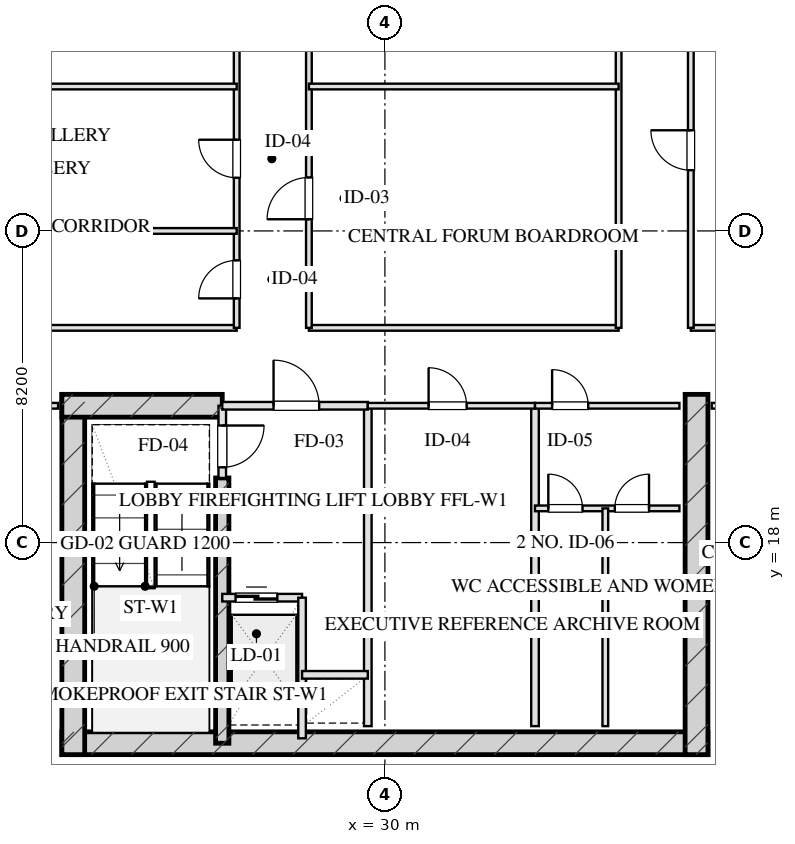
"""IFC4 building model, lengths in metres.
Left out: names, types, materials, properties, quantities, classifications, styles, units other than length and angle.
Written with IfcOpenShell. Run it as: python <this file> out.ifc"""

import sys

from ifc_helpers import new_model, si_unit, direction, frame, frame_2d, origin, place, context, subcontext, project, spatial, rectangle, extrude, element, fill, save


model = new_model("IFC4")
c1 = context("Model", 3, precision=1e-05, world=origin(), true_north=direction((0.0, 1.0)))
c2 = subcontext(c1, "Body", "Model", "MODEL_VIEW")
j1 = project(units=[si_unit("LENGTHUNIT", "METRE"), si_unit("PLANEANGLEUNIT", "RADIAN")], contexts=[c1])
p1 = place(None, origin())
s1 = spatial("IfcSite", under=j1, at=p1, CompositionType="ELEMENT")
p2 = place(p1, origin())
s2 = spatial("IfcBuilding", under=s1, at=p2, CompositionType="ELEMENT")
p3 = place(p2, frame((0.0, 0.0, 180.55)))
s3 = spatial("IfcBuildingStorey", under=s2, at=p3, CompositionType="ELEMENT", Elevation=180.55)
p4 = place(p3, frame((21.5, 12.72, 0.0), z_axis=(0.0, 0.0, 1.0), x_axis=(1.0, 0.0, 0.0)))
e1 = element("IfcWall", 1, at=p4, inside=s3, PredefinedType="SHEAR", context=c2, shape_type="SweptSolid", body=[
    extrude(rectangle(XDim=17.0, YDim=0.6, at=frame_2d((8.5, 0.0))), origin(), (0.0, 0.0, 1.0), 3.45),
])
for number, where, z_axis, x_axis in (
    (2, (21.8, 21.9, 0.0), (0.0, 0.0, 1.0), (0.0, -1.0, 0.0)),
    (3, (38.2, 21.9, 0.0), (0.0, 0.0, 1.0), (0.0, -1.0, 0.0)),
):
    element("IfcWall", number, at=place(p3, frame(where, z_axis=z_axis, x_axis=x_axis)), inside=s3, PredefinedType="SHEAR", context=c2, shape_type="SweptSolid", body=[
        extrude(rectangle(XDim=9.48, YDim=0.6, at=frame_2d((4.74, 0.0))), origin(), (0.0, 0.0, 1.0), 3.45),
    ])
p5 = place(p3, frame((25.72, 19.7, 0.0), z_axis=(0.0, 0.0, 1.0), x_axis=(0.0, -1.0, 0.0)))
e4 = element("IfcWall", 4, at=p5, inside=s3, PredefinedType="SHEAR", context=c2, shape_type="SweptSolid", body=[
    extrude(rectangle(XDim=6.98, YDim=0.35, at=frame_2d((3.49, 0.0))), origin(), (0.0, 0.0, 1.0), 3.45),
])
p6 = place(p3, frame((21.5, 21.6, 0.0), z_axis=(0.0, 0.0, 1.0), x_axis=(1.0, 0.0, 0.0)))
e5 = element("IfcWall", 5, at=p6, inside=s3, PredefinedType="SHEAR", context=c2, shape_type="SweptSolid", body=[
    extrude(rectangle(XDim=4.22, YDim=0.6, at=frame_2d((2.11, 0.0))), origin(), (0.0, 0.0, 1.0), 3.45),
])
p7 = place(p3, frame((25.72, 21.6, 0.0), z_axis=(0.0, 0.0, 1.0), x_axis=(0.0, -1.0, 0.0)))
e6 = element("IfcWall", 6, at=p7, inside=s3, PredefinedType="PARTITIONING", context=c2, shape_type="SweptSolid", body=[
    extrude(rectangle(XDim=1.9, YDim=0.2, at=frame_2d((0.95, 0.0))), origin(), (0.0, 0.0, 1.0), 3.155),
])
p8 = place(p7, frame((0.52, 0.0, 0.0)))
e7 = element("IfcOpeningElement", 7, at=p8, cuts=e6, PredefinedType="OPENING", context=c2, shape_type="SweptSolid", body=[
    extrude(rectangle(XDim=1.1, YDim=2.05, at=frame_2d((0.55, 1.025))), frame((0.0, 0.11, 0.0), z_axis=(0.0, -1.0, 0.0), x_axis=(1.0, 0.0, 0.0)), (0.0, 0.0, 1.0), 0.22),
])
p9 = place(p3, frame((29.55, 21.6, 0.0), z_axis=(0.0, 0.0, 1.0), x_axis=(0.0, -1.0, 0.0)))
e8 = element("IfcWall", 8, at=p9, inside=s3, PredefinedType="PARTITIONING", context=c2, shape_type="SweptSolid", body=[
    extrude(rectangle(XDim=8.43, YDim=0.2, at=frame_2d((4.215, 0.0))), origin(), (0.0, 0.0, 1.0), 3.155),
])
p10 = place(p3, frame((25.72, 21.6, 0.0), z_axis=(0.0, 0.0, 1.0), x_axis=(1.0, 0.0, 0.0)))
e9 = element("IfcWall", 9, at=p10, inside=s3, PredefinedType="PARTITIONING", context=c2, shape_type="SweptSolid", body=[
    extrude(rectangle(XDim=3.83, YDim=0.2, at=frame_2d((1.915, 0.0))), origin(), (0.0, 0.0, 1.0), 3.155),
])
p11 = place(p10, frame((1.35, 0.0, 0.0)))
e10 = element("IfcOpeningElement", 10, at=p11, cuts=e9, PredefinedType="OPENING", context=c2, shape_type="SweptSolid", body=[
    extrude(rectangle(XDim=1.2, YDim=2.05, at=frame_2d((0.6, 1.025))), frame((0.0, 0.11, 0.0), z_axis=(0.0, -1.0, 0.0), x_axis=(1.0, 0.0, 0.0)), (0.0, 0.0, 1.0), 0.22),
])
p12 = place(p3, frame((25.72, 16.55, 0.0), z_axis=(0.0, 0.0, 1.0), x_axis=(1.0, 0.0, 0.0)))
e11 = element("IfcWall", 11, at=p12, inside=s3, PredefinedType="PARTITIONING", context=c2, shape_type="SweptSolid", body=[
    extrude(rectangle(XDim=2.1, YDim=0.2, at=frame_2d((1.05, 0.0))), origin(), (0.0, 0.0, 1.0), 3.155),
])
p13 = place(p12, frame((0.35, 0.0, 0.0)))
e12 = element("IfcOpeningElement", 12, at=p13, cuts=e11, PredefinedType="OPENING", context=c2, shape_type="SweptSolid", body=[
    extrude(rectangle(XDim=1.1, YDim=2.05, at=frame_2d((0.55, 1.025))), frame((0.0, 0.11, 0.0), z_axis=(0.0, -1.0, 0.0), x_axis=(1.0, 0.0, 0.0)), (0.0, 0.0, 1.0), 0.22),
])
p14 = place(p3, frame((27.82, 16.55, 0.0), z_axis=(0.0, 0.0, 1.0), x_axis=(0.0, -1.0, 0.0)))
e13 = element("IfcWall", 13, at=p14, inside=s3, PredefinedType="PARTITIONING", context=c2, shape_type="SweptSolid", body=[
    extrude(rectangle(XDim=3.7, YDim=0.2, at=frame_2d((1.85, 0.0))), origin(), (0.0, 0.0, 1.0), 3.155),
])
p15 = place(p3, frame((27.82, 14.52, 0.0), z_axis=(0.0, 0.0, 1.0), x_axis=(1.0, 0.0, 0.0)))
e14 = element("IfcWall", 14, at=p15, inside=s3, PredefinedType="PARTITIONING", context=c2, shape_type="SweptSolid", body=[
    extrude(rectangle(XDim=1.73, YDim=0.2, at=frame_2d((0.865, 0.0))), origin(), (0.0, 0.0, 1.0), 3.155),
])
p16 = place(p3, frame((33.95, 21.6, 0.0), z_axis=(0.0, 0.0, 1.0), x_axis=(0.0, -1.0, 0.0)))
e15 = element("IfcWall", 15, at=p16, inside=s3, PredefinedType="PARTITIONING", context=c2, shape_type="SweptSolid", body=[
    extrude(rectangle(XDim=8.43, YDim=0.2, at=frame_2d((4.215, 0.0))), origin(), (0.0, 0.0, 1.0), 3.155),
])
p17 = place(p3, frame((29.55, 21.6, 0.0), z_axis=(0.0, 0.0, 1.0), x_axis=(1.0, 0.0, 0.0)))
e16 = element("IfcWall", 16, at=p17, inside=s3, PredefinedType="PARTITIONING", context=c2, shape_type="SweptSolid", body=[
    extrude(rectangle(XDim=4.4, YDim=0.15, at=frame_2d((2.2, 0.0))), origin(), (0.0, 0.0, 1.0), 3.155),
])
p18 = place(p17, frame((1.6, 0.0, 0.0)))
e17 = element("IfcOpeningElement", 17, at=p18, cuts=e16, PredefinedType="OPENING", context=c2, shape_type="SweptSolid", body=[
    extrude(rectangle(XDim=1.0, YDim=2.05, at=frame_2d((0.5, 1.025))), frame((0.0, 0.085, 0.0), z_axis=(0.0, -1.0, 0.0), x_axis=(1.0, 0.0, 0.0)), (0.0, 0.0, 1.0), 0.17),
])
p19 = place(p3, frame((33.95, 21.6, 0.0), z_axis=(0.0, 0.0, 1.0), x_axis=(1.0, 0.0, 0.0)))
e18 = element("IfcWall", 18, at=p19, inside=s3, PredefinedType="PARTITIONING", context=c2, shape_type="SweptSolid", body=[
    extrude(rectangle(XDim=3.8, YDim=0.15, at=frame_2d((1.9, 0.0))), origin(), (0.0, 0.0, 1.0), 3.155),
])
p20 = place(p19, frame((0.45, 0.0, 0.0)))
e19 = element("IfcOpeningElement", 19, at=p20, cuts=e18, PredefinedType="OPENING", context=c2, shape_type="SweptSolid", body=[
    extrude(rectangle(XDim=0.95, YDim=2.05, at=frame_2d((0.475, 1.025))), frame((0.0, 0.085, 0.0), z_axis=(0.0, -1.0, 0.0), x_axis=(1.0, 0.0, 0.0)), (0.0, 0.0, 1.0), 0.17),
])
p21 = place(p3, frame((33.95, 18.9, 0.0), z_axis=(0.0, 0.0, 1.0), x_axis=(1.0, 0.0, 0.0)))
e20 = element("IfcWall", 20, at=p21, inside=s3, PredefinedType="PARTITIONING", context=c2, shape_type="SweptSolid", body=[
    extrude(rectangle(XDim=3.8, YDim=0.15, at=frame_2d((1.9, 0.0))), origin(), (0.0, 0.0, 1.0), 3.155),
])
p22 = place(p21, frame((0.35, 0.0, 0.0)))
e21 = element("IfcOpeningElement", 21, at=p22, cuts=e20, PredefinedType="OPENING", context=c2, shape_type="SweptSolid", body=[
    extrude(rectangle(XDim=0.9, YDim=2.05, at=frame_2d((0.45, 1.025))), frame((0.0, 0.085, 0.0), z_axis=(0.0, -1.0, 0.0), x_axis=(1.0, 0.0, 0.0)), (0.0, 0.0, 1.0), 0.17),
])
p23 = place(p21, frame((2.1, 0.0, 0.0)))
e22 = element("IfcOpeningElement", 22, at=p23, cuts=e20, PredefinedType="OPENING", context=c2, shape_type="SweptSolid", body=[
    extrude(rectangle(XDim=0.9, YDim=2.05, at=frame_2d((0.45, 1.025))), frame((0.0, 0.085, 0.0), z_axis=(0.0, -1.0, 0.0), x_axis=(1.0, 0.0, 0.0)), (0.0, 0.0, 1.0), 0.17),
])
p24 = place(p3, frame((35.8, 18.9, 0.0), z_axis=(0.0, 0.0, 1.0), x_axis=(0.0, -1.0, 0.0)))
e23 = element("IfcWall", 23, at=p24, inside=s3, PredefinedType="PARTITIONING", context=c2, shape_type="SweptSolid", body=[
    extrude(rectangle(XDim=5.73, YDim=0.15, at=frame_2d((2.865, 0.0))), origin(), (0.0, 0.0, 1.0), 3.155),
])
p25 = place(p3, frame((13.2, 21.6, 0.0), z_axis=(0.0, 0.0, 1.0), x_axis=(1.0, 0.0, 0.0)))
e24 = element("IfcWall", 24, at=p25, inside=s3, PredefinedType="PARTITIONING", context=c2, shape_type="SweptSolid", body=[
    extrude(rectangle(XDim=8.2, YDim=0.15, at=frame_2d((4.1, 0.0))), origin(), (0.0, 0.0, 1.0), 3.155),
])
p26 = place(p25, frame((3.444, 0.0, 0.0)))
e25 = element("IfcOpeningElement", 25, at=p26, cuts=e24, PredefinedType="OPENING", context=c2, shape_type="SweptSolid", body=[
    extrude(rectangle(XDim=1.0, YDim=2.05, at=frame_2d((0.5, 1.025))), frame((0.0, 0.085, 0.0), z_axis=(0.0, -1.0, 0.0), x_axis=(1.0, 0.0, 0.0)), (0.0, 0.0, 1.0), 0.17),
])
p27 = place(p3, frame((38.6, 21.6, 0.0), z_axis=(0.0, 0.0, 1.0), x_axis=(1.0, 0.0, 0.0)))
e26 = element("IfcWall", 26, at=p27, inside=s3, PredefinedType="PARTITIONING", context=c2, shape_type="SweptSolid", body=[
    extrude(rectangle(XDim=8.2, YDim=0.15, at=frame_2d((4.1, 0.0))), origin(), (0.0, 0.0, 1.0), 3.155),
])
p28 = place(p27, frame((3.444, 0.0, 0.0)))
e27 = element("IfcOpeningElement", 27, at=p28, cuts=e26, PredefinedType="OPENING", context=c2, shape_type="SweptSolid", body=[
    extrude(rectangle(XDim=0.85, YDim=2.05, at=frame_2d((0.425, 1.025))), frame((0.0, 0.085, 0.0), z_axis=(0.0, -1.0, 0.0), x_axis=(1.0, 0.0, 0.0)), (0.0, 0.0, 1.0), 0.17),
])
p29 = place(p3, frame((13.2, 23.65, 0.0), z_axis=(0.0, 0.0, 1.0), x_axis=(1.0, 0.0, 0.0)))
e28 = element("IfcWall", 28, at=p29, inside=s3, PredefinedType="PARTITIONING", context=c2, shape_type="SweptSolid", body=[
    extrude(rectangle(XDim=12.9, YDim=0.15, at=frame_2d((6.45, 0.0))), origin(), (0.0, 0.0, 1.0), 3.155),
])
p30 = place(p3, frame((28.0, 23.65, 0.0), z_axis=(0.0, 0.0, 1.0), x_axis=(1.0, 0.0, 0.0)))
e29 = element("IfcWall", 29, at=p30, inside=s3, PredefinedType="PARTITIONING", context=c2, shape_type="SweptSolid", body=[
    extrude(rectangle(XDim=8.15, YDim=0.15, at=frame_2d((4.075, 0.0))), origin(), (0.0, 0.0, 1.0), 3.155),
])
p31 = place(p3, frame((38.05, 23.65, 0.0), z_axis=(0.0, 0.0, 1.0), x_axis=(1.0, 0.0, 0.0)))
e30 = element("IfcWall", 30, at=p31, inside=s3, PredefinedType="PARTITIONING", context=c2, shape_type="SweptSolid", body=[
    extrude(rectangle(XDim=8.75, YDim=0.15, at=frame_2d((4.375, 0.0))), origin(), (0.0, 0.0, 1.0), 3.155),
])
p32 = place(p3, frame((26.1, 23.65, 0.0), z_axis=(0.0, 0.0, 1.0), x_axis=(0.0, 1.0, 0.0)))
e31 = element("IfcWall", 31, at=p32, inside=s3, PredefinedType="PARTITIONING", context=c2, shape_type="SweptSolid", body=[
    extrude(rectangle(XDim=20.7, YDim=0.15, at=frame_2d((10.35, 0.0))), origin(), (0.0, 0.0, 1.0), 3.155),
])
p33 = place(p32, frame((0.775, 0.0, 0.0)))
e32 = element("IfcOpeningElement", 32, at=p33, cuts=e31, PredefinedType="OPENING", context=c2, shape_type="SweptSolid", body=[
    extrude(rectangle(XDim=1.0, YDim=2.05, at=frame_2d((0.5, 1.025))), frame((0.0, 0.085, 0.0), z_axis=(0.0, -1.0, 0.0), x_axis=(1.0, 0.0, 0.0)), (0.0, 0.0, 1.0), 0.17),
])
p34 = place(p32, frame((3.95, 0.0, 0.0)))
e33 = element("IfcOpeningElement", 33, at=p34, cuts=e31, PredefinedType="OPENING", context=c2, shape_type="SweptSolid", body=[
    extrude(rectangle(XDim=1.0, YDim=2.05, at=frame_2d((0.5, 1.025))), frame((0.0, 0.085, 0.0), z_axis=(0.0, -1.0, 0.0), x_axis=(1.0, 0.0, 0.0)), (0.0, 0.0, 1.0), 0.17),
])
p35 = place(p32, frame((7.51, 0.0, 0.0)))
e34 = element("IfcOpeningElement", 34, at=p35, cuts=e31, PredefinedType="OPENING", context=c2, shape_type="SweptSolid", body=[
    extrude(rectangle(XDim=1.05, YDim=2.05, at=frame_2d((0.525, 1.025))), frame((0.0, 0.085, 0.0), z_axis=(0.0, -1.0, 0.0), x_axis=(1.0, 0.0, 0.0)), (0.0, 0.0, 1.0), 0.17),
])
p36 = place(p32, frame((11.51, 0.0, 0.0)))
e35 = element("IfcOpeningElement", 35, at=p36, cuts=e31, PredefinedType="OPENING", context=c2, shape_type="SweptSolid", body=[
    extrude(rectangle(XDim=1.0, YDim=2.05, at=frame_2d((0.5, 1.025))), frame((0.0, 0.085, 0.0), z_axis=(0.0, -1.0, 0.0), x_axis=(1.0, 0.0, 0.0)), (0.0, 0.0, 1.0), 0.17),
])
p37 = place(p32, frame((15.75, 0.0, 0.0)))
e36 = element("IfcOpeningElement", 36, at=p37, cuts=e31, PredefinedType="OPENING", context=c2, shape_type="SweptSolid", body=[
    extrude(rectangle(XDim=1.0, YDim=2.05, at=frame_2d((0.5, 1.025))), frame((0.0, 0.085, 0.0), z_axis=(0.0, -1.0, 0.0), x_axis=(1.0, 0.0, 0.0)), (0.0, 0.0, 1.0), 0.17),
])
p38 = place(p32, frame((18.925, 0.0, 0.0)))
e37 = element("IfcOpeningElement", 37, at=p38, cuts=e31, PredefinedType="OPENING", context=c2, shape_type="SweptSolid", body=[
    extrude(rectangle(XDim=1.0, YDim=2.05, at=frame_2d((0.5, 1.025))), frame((0.0, 0.085, 0.0), z_axis=(0.0, -1.0, 0.0), x_axis=(1.0, 0.0, 0.0)), (0.0, 0.0, 1.0), 0.17),
])
p39 = place(p3, frame((28.0, 23.65, 0.0), z_axis=(0.0, 0.0, 1.0), x_axis=(0.0, 1.0, 0.0)))
e38 = element("IfcWall", 38, at=p39, inside=s3, PredefinedType="PARTITIONING", context=c2, shape_type="SweptSolid", body=[
    extrude(rectangle(XDim=20.7, YDim=0.15, at=frame_2d((10.35, 0.0))), origin(), (0.0, 0.0, 1.0), 3.155),
])
p40 = place(p39, frame((2.857, 0.0, 0.0)))
e39 = element("IfcOpeningElement", 39, at=p40, cuts=e38, PredefinedType="OPENING", context=c2, shape_type="SweptSolid", body=[
    extrude(rectangle(XDim=1.1, YDim=2.05, at=frame_2d((0.55, 1.025))), frame((0.0, 0.085, 0.0), z_axis=(0.0, -1.0, 0.0), x_axis=(1.0, 0.0, 0.0)), (0.0, 0.0, 1.0), 0.17),
])
p41 = place(p39, frame((17.208, 0.0, 0.0)))
e40 = element("IfcOpeningElement", 40, at=p41, cuts=e38, PredefinedType="OPENING", context=c2, shape_type="SweptSolid", body=[
    extrude(rectangle(XDim=1.1, YDim=2.05, at=frame_2d((0.55, 1.025))), frame((0.0, 0.085, 0.0), z_axis=(0.0, -1.0, 0.0), x_axis=(1.0, 0.0, 0.0)), (0.0, 0.0, 1.0), 0.17),
])
p42 = place(p3, frame((36.15, 23.65, 0.0), z_axis=(0.0, 0.0, 1.0), x_axis=(0.0, 1.0, 0.0)))
e41 = element("IfcWall", 41, at=p42, inside=s3, PredefinedType="PARTITIONING", context=c2, shape_type="SweptSolid", body=[
    extrude(rectangle(XDim=20.7, YDim=0.15, at=frame_2d((10.35, 0.0))), origin(), (0.0, 0.0, 1.0), 3.155),
])
p43 = place(p42, frame((9.71, 0.0, 0.0)))
e42 = element("IfcOpeningElement", 42, at=p43, cuts=e41, PredefinedType="OPENING", context=c2, shape_type="SweptSolid", body=[
    extrude(rectangle(XDim=1.1, YDim=2.05, at=frame_2d((0.55, 1.025))), frame((0.0, 0.085, 0.0), z_axis=(0.0, -1.0, 0.0), x_axis=(1.0, 0.0, 0.0)), (0.0, 0.0, 1.0), 0.17),
])
p44 = place(p3, frame((38.05, 23.65, 0.0), z_axis=(0.0, 0.0, 1.0), x_axis=(0.0, 1.0, 0.0)))
e43 = element("IfcWall", 43, at=p44, inside=s3, PredefinedType="PARTITIONING", context=c2, shape_type="SweptSolid", body=[
    extrude(rectangle(XDim=20.7, YDim=0.15, at=frame_2d((10.35, 0.0))), origin(), (0.0, 0.0, 1.0), 3.155),
])
p45 = place(p44, frame((4.148, 0.0, 0.0)))
e44 = element("IfcOpeningElement", 44, at=p45, cuts=e43, PredefinedType="OPENING", context=c2, shape_type="SweptSolid", body=[
    extrude(rectangle(XDim=1.05, YDim=2.05, at=frame_2d((0.525, 1.025))), frame((0.0, 0.085, 0.0), z_axis=(0.0, -1.0, 0.0), x_axis=(1.0, 0.0, 0.0)), (0.0, 0.0, 1.0), 0.17),
])
p46 = place(p44, frame((14.499, 0.0, 0.0)))
e45 = element("IfcOpeningElement", 45, at=p46, cuts=e43, PredefinedType="OPENING", context=c2, shape_type="SweptSolid", body=[
    extrude(rectangle(XDim=1.0, YDim=2.05, at=frame_2d((0.5, 1.025))), frame((0.0, 0.085, 0.0), z_axis=(0.0, -1.0, 0.0), x_axis=(1.0, 0.0, 0.0)), (0.0, 0.0, 1.0), 0.17),
])
p47 = place(p3, frame((28.0, 30.0, 0.0), z_axis=(0.0, 0.0, 1.0), x_axis=(1.0, 0.0, 0.0)))
e46 = element("IfcWall", 46, at=p47, inside=s3, PredefinedType="PARTITIONING", context=c2, shape_type="SweptSolid", body=[
    extrude(rectangle(XDim=8.15, YDim=0.15, at=frame_2d((4.075, 0.0))), origin(), (0.0, 0.0, 1.0), 3.155),
])
for number, where, z_axis, x_axis in (
    (47, (13.2, 26.2, 0.0), (0.0, 0.0, 1.0), (1.0, 0.0, 0.0)),
    (48, (13.2, 30.0, 0.0), (0.0, 0.0, 1.0), (1.0, 0.0, 0.0)),
):
    element("IfcWall", number, at=place(p3, frame(where, z_axis=z_axis, x_axis=x_axis)), inside=s3, PredefinedType="PARTITIONING", context=c2, shape_type="SweptSolid", body=[
        extrude(rectangle(XDim=12.9, YDim=0.15, at=frame_2d((6.45, 0.0))), origin(), (0.0, 0.0, 1.0), 3.155),
    ])
p48 = place(p8, origin())
e49 = element("IfcDoor", 49, at=p48, inside=s3, OperationType="SINGLE_SWING_LEFT", PredefinedType="DOOR", context=c2, shape_type="SweptSolid", body=[
    extrude(rectangle(XDim=1.1, YDim=2.05, at=frame_2d((0.55, 1.025))), frame((0.0, 0.025, 0.0), z_axis=(0.0, -1.0, 0.0), x_axis=(1.0, 0.0, 0.0)), (0.0, 0.0, 1.0), 0.05),
])
fill(e7, e49)
p49 = place(p11, origin())
e50 = element("IfcDoor", 50, at=p49, inside=s3, OperationType="SINGLE_SWING_LEFT", PredefinedType="DOOR", context=c2, shape_type="SweptSolid", body=[
    extrude(rectangle(XDim=1.2, YDim=2.05, at=frame_2d((0.6, 1.025))), frame((0.0, 0.025, 0.0), z_axis=(0.0, -1.0, 0.0), x_axis=(1.0, 0.0, 0.0)), (0.0, 0.0, 1.0), 0.05),
])
fill(e10, e50)
p50 = place(p13, origin())
e51 = element("IfcDoor", 51, at=p50, inside=s3, OperationType="DOUBLE_DOOR_SLIDING", PredefinedType="DOOR", context=c2, shape_type="SweptSolid", body=[
    extrude(rectangle(XDim=1.1, YDim=2.05, at=frame_2d((0.55, 1.025))), frame((0.0, 0.025, 0.0), z_axis=(0.0, -1.0, 0.0), x_axis=(1.0, 0.0, 0.0)), (0.0, 0.0, 1.0), 0.05),
])
fill(e12, e51)
p51 = place(p18, origin())
e52 = element("IfcDoor", 52, at=p51, inside=s3, OperationType="SINGLE_SWING_LEFT", PredefinedType="DOOR", context=c2, shape_type="SweptSolid", body=[
    extrude(rectangle(XDim=1.0, YDim=2.05, at=frame_2d((0.5, 1.025))), frame((0.0, 0.025, 0.0), z_axis=(0.0, -1.0, 0.0), x_axis=(1.0, 0.0, 0.0)), (0.0, 0.0, 1.0), 0.05),
])
fill(e17, e52)
p52 = place(p20, origin())
e53 = element("IfcDoor", 53, at=p52, inside=s3, OperationType="SINGLE_SWING_LEFT", PredefinedType="DOOR", context=c2, shape_type="SweptSolid", body=[
    extrude(rectangle(XDim=0.95, YDim=2.05, at=frame_2d((0.475, 1.025))), frame((0.0, 0.025, 0.0), z_axis=(0.0, -1.0, 0.0), x_axis=(1.0, 0.0, 0.0)), (0.0, 0.0, 1.0), 0.05),
])
fill(e19, e53)
p53 = place(p22, origin())
e54 = element("IfcDoor", 54, at=p53, inside=s3, OperationType="SINGLE_SWING_LEFT", PredefinedType="DOOR", context=c2, shape_type="SweptSolid", body=[
    extrude(rectangle(XDim=0.9, YDim=2.05, at=frame_2d((0.45, 1.025))), frame((0.0, 0.025, 0.0), z_axis=(0.0, -1.0, 0.0), x_axis=(1.0, 0.0, 0.0)), (0.0, 0.0, 1.0), 0.05),
])
fill(e21, e54)
p54 = place(p23, origin())
e55 = element("IfcDoor", 55, at=p54, inside=s3, OperationType="SINGLE_SWING_RIGHT", PredefinedType="DOOR", context=c2, shape_type="SweptSolid", body=[
    extrude(rectangle(XDim=0.9, YDim=2.05, at=frame_2d((0.45, 1.025))), frame((0.0, 0.025, 0.0), z_axis=(0.0, -1.0, 0.0), x_axis=(1.0, 0.0, 0.0)), (0.0, 0.0, 1.0), 0.05),
])
fill(e22, e55)
p55 = place(p33, origin())
e56 = element("IfcDoor", 56, at=p55, inside=s3, OperationType="SINGLE_SWING_LEFT", PredefinedType="DOOR", context=c2, shape_type="SweptSolid", body=[
    extrude(rectangle(XDim=1.0, YDim=2.05, at=frame_2d((0.5, 1.025))), frame((0.0, 0.025, 0.0), z_axis=(0.0, -1.0, 0.0), x_axis=(1.0, 0.0, 0.0)), (0.0, 0.0, 1.0), 0.05),
])
fill(e32, e56)
p56 = place(p34, origin())
e57 = element("IfcDoor", 57, at=p56, inside=s3, OperationType="SINGLE_SWING_RIGHT", PredefinedType="DOOR", context=c2, shape_type="SweptSolid", body=[
    extrude(rectangle(XDim=1.0, YDim=2.05, at=frame_2d((0.5, 1.025))), frame((0.0, 0.025, 0.0), z_axis=(0.0, -1.0, 0.0), x_axis=(1.0, 0.0, 0.0)), (0.0, 0.0, 1.0), 0.05),
])
fill(e33, e57)
p57 = place(p40, origin())
e58 = element("IfcDoor", 58, at=p57, inside=s3, OperationType="SINGLE_SWING_LEFT", PredefinedType="DOOR", context=c2, shape_type="SweptSolid", body=[
    extrude(rectangle(XDim=1.1, YDim=2.05, at=frame_2d((0.55, 1.025))), frame((0.0, 0.025, 0.0), z_axis=(0.0, -1.0, 0.0), x_axis=(1.0, 0.0, 0.0)), (0.0, 0.0, 1.0), 0.05),
])
fill(e39, e58)
p58 = place(p45, origin())
e59 = element("IfcDoor", 59, at=p58, inside=s3, OperationType="SINGLE_SWING_RIGHT", PredefinedType="DOOR", context=c2, shape_type="SweptSolid", body=[
    extrude(rectangle(XDim=1.05, YDim=2.05, at=frame_2d((0.525, 1.025))), frame((0.0, 0.025, 0.0), z_axis=(0.0, -1.0, 0.0), x_axis=(1.0, 0.0, 0.0)), (0.0, 0.0, 1.0), 0.05),
])
fill(e44, e59)
save(model, sys.argv[1])
